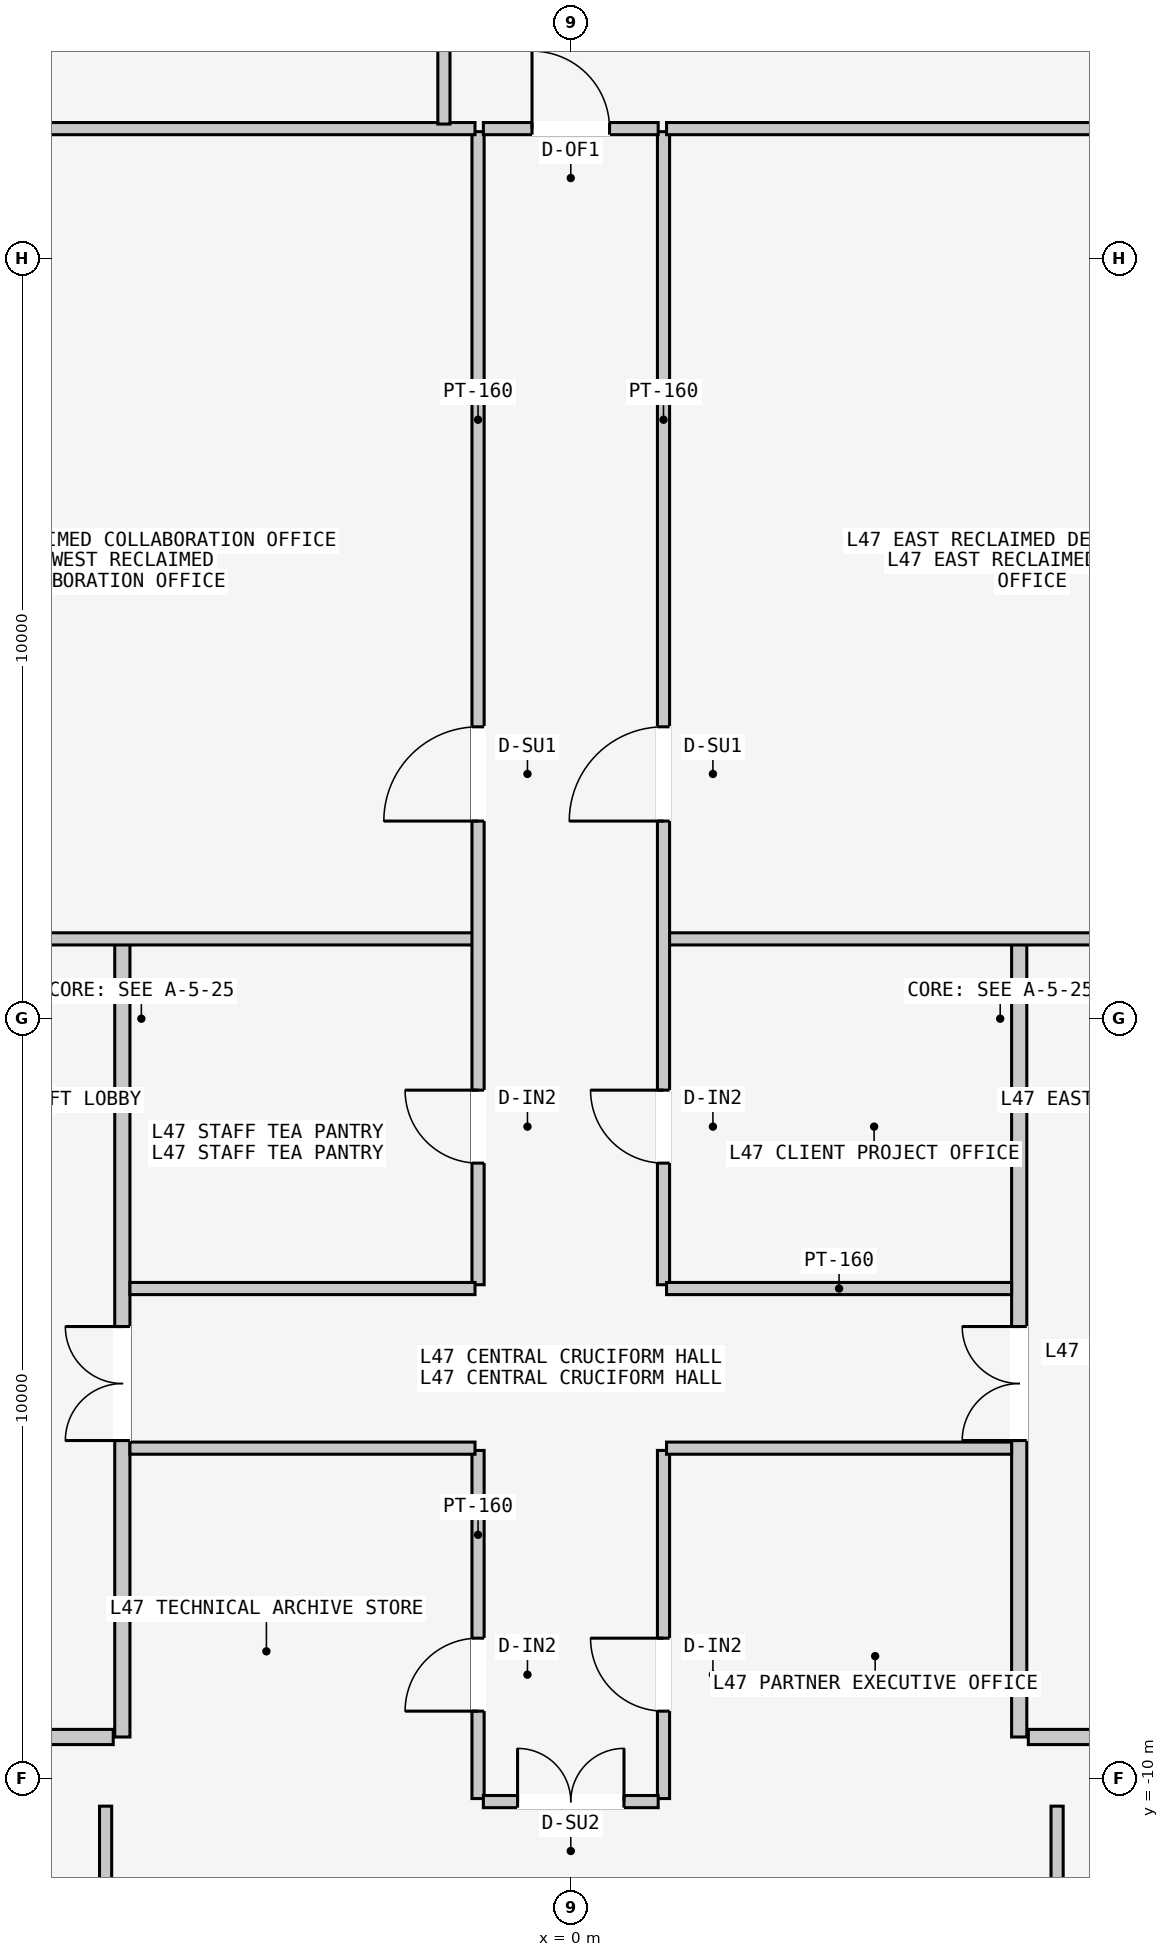
"""IFC4 building model, lengths in metres.
Left out: names, types, materials, properties, quantities, classifications, styles, units other than length and angle.
Written with IfcOpenShell. Run it as: python <this file> out.ifc"""

import sys

from ifc_helpers import new_model, si_unit, direction, frame, frame_2d, origin, place, context, subcontext, project, spatial, rectangle, extrude, element, fill, save


model = new_model("IFC4")
c1 = context("Model", 3, precision=1e-05, world=origin(), true_north=direction((0.0, 1.0)))
c2 = subcontext(c1, "Body", "Model", "MODEL_VIEW")
j1 = project(units=[si_unit("LENGTHUNIT", "METRE"), si_unit("PLANEANGLEUNIT", "RADIAN")], contexts=[c1])
p1 = place(None, origin())
s1 = spatial("IfcSite", under=j1, at=p1, CompositionType="ELEMENT")
p2 = place(p1, origin())
s2 = spatial("IfcBuilding", under=s1, at=p2, CompositionType="ELEMENT")
p3 = place(p2, frame((0.0, 0.0, 180.3)))
s3 = spatial("IfcBuildingStorey", under=s2, at=p3, CompositionType="ELEMENT", Elevation=180.3)
p4 = place(p3, frame((-5.9, -9.45, 0.0), z_axis=(0.0, 0.0, 1.0), x_axis=(0.0, 1.0, 0.0)))
e1 = element("IfcWall", 1, at=p4, inside=s3, PredefinedType="PARTITIONING", context=c2, shape_type="SweptSolid", body=[
    extrude(rectangle(XDim=10.5, YDim=0.2, at=frame_2d((5.25, 0.0))), origin(), (0.0, 0.0, 1.0), 3.4),
])
p5 = place(p4, frame((3.9, 0.0, 0.0)))
e2 = element("IfcOpeningElement", 2, at=p5, cuts=e1, PredefinedType="OPENING", context=c2, shape_type="SweptSolid", body=[
    extrude(rectangle(XDim=1.5, YDim=2.2, at=frame_2d((0.75, 1.1))), frame((0.0, 0.11, 0.0), z_axis=(0.0, -1.0, 0.0), x_axis=(1.0, 0.0, 0.0)), (0.0, 0.0, 1.0), 0.22),
])
p6 = place(p3, frame((-6.02, -9.45, 0.0), z_axis=(0.0, 0.0, 1.0), x_axis=(-1.0, 0.0, 0.0)))
e3 = element("IfcWall", 3, at=p6, inside=s3, PredefinedType="PARTITIONING", context=c2, shape_type="SweptSolid", body=[
    extrude(rectangle(XDim=1.8, YDim=0.2, at=frame_2d((0.9, 0.0))), origin(), (0.0, 0.0, 1.0), 3.4),
])
p7 = place(p3, frame((5.9, -9.45, 0.0), z_axis=(0.0, 0.0, 1.0), x_axis=(0.0, 1.0, 0.0)))
e4 = element("IfcWall", 4, at=p7, inside=s3, PredefinedType="PARTITIONING", context=c2, shape_type="SweptSolid", body=[
    extrude(rectangle(XDim=10.5, YDim=0.2, at=frame_2d((5.25, 0.0))), origin(), (0.0, 0.0, 1.0), 3.4),
])
p8 = place(p7, frame((3.9, 0.0, 0.0)))
e5 = element("IfcOpeningElement", 5, at=p8, cuts=e4, PredefinedType="OPENING", context=c2, shape_type="SweptSolid", body=[
    extrude(rectangle(XDim=1.5, YDim=2.2, at=frame_2d((0.75, 1.1))), frame((0.0, 0.11, 0.0), z_axis=(0.0, -1.0, 0.0), x_axis=(1.0, 0.0, 0.0)), (0.0, 0.0, 1.0), 0.22),
])
p9 = place(p3, frame((6.02, -9.45, 0.0), z_axis=(0.0, 0.0, 1.0), x_axis=(1.0, 0.0, 0.0)))
e6 = element("IfcWall", 6, at=p9, inside=s3, PredefinedType="PARTITIONING", context=c2, shape_type="SweptSolid", body=[
    extrude(rectangle(XDim=1.8, YDim=0.2, at=frame_2d((0.9, 0.0))), origin(), (0.0, 0.0, 1.0), 3.4),
])
p10 = place(p3, frame((-10.05, 1.05, 0.0), z_axis=(0.0, 0.0, 1.0), x_axis=(1.0, 0.0, 0.0)))
e7 = element("IfcWall", 7, at=p10, inside=s3, PredefinedType="PARTITIONING", context=c2, shape_type="SweptSolid", body=[
    extrude(rectangle(XDim=8.79, YDim=0.16, at=frame_2d((4.395, 0.0))), origin(), (0.0, 0.0, 1.0), 3.4),
])
p11 = place(p3, frame((-1.22, -3.5, 0.0), z_axis=(0.0, 0.0, 1.0), x_axis=(0.0, 1.0, 0.0)))
e8 = element("IfcWall", 8, at=p11, inside=s3, PredefinedType="PARTITIONING", context=c2, shape_type="SweptSolid", body=[
    extrude(rectangle(XDim=15.17, YDim=0.16, at=frame_2d((7.585, 0.0))), origin(), (0.0, 0.0, 1.0), 3.4),
])
p12 = place(p11, frame((6.1, 0.0, 0.0)))
e9 = element("IfcOpeningElement", 9, at=p12, cuts=e8, PredefinedType="OPENING", context=c2, shape_type="SweptSolid", body=[
    extrude(rectangle(XDim=1.24, YDim=2.24, at=frame_2d((0.62, 1.12))), frame((0.0, 0.09, 0.0), z_axis=(0.0, -1.0, 0.0), x_axis=(1.0, 0.0, 0.0)), (0.0, 0.0, 1.0), 0.18),
])
p13 = place(p11, frame((1.6, 0.0, 0.0)))
e10 = element("IfcOpeningElement", 10, at=p13, cuts=e8, PredefinedType="OPENING", context=c2, shape_type="SweptSolid", body=[
    extrude(rectangle(XDim=0.96, YDim=2.18, at=frame_2d((0.48, 1.09))), frame((0.0, 0.09, 0.0), z_axis=(0.0, -1.0, 0.0), x_axis=(1.0, 0.0, 0.0)), (0.0, 0.0, 1.0), 0.18),
])
p14 = place(p3, frame((-7.5, 11.71, 0.0), z_axis=(0.0, 0.0, 1.0), x_axis=(1.0, 0.0, 0.0)))
e11 = element("IfcWall", 11, at=p14, inside=s3, PredefinedType="PARTITIONING", context=c2, shape_type="SweptSolid", body=[
    extrude(rectangle(XDim=6.24, YDim=0.16, at=frame_2d((3.12, 0.0))), origin(), (0.0, 0.0, 1.0), 3.4),
])
p15 = place(p3, frame((-5.8, -3.55, 0.0), z_axis=(0.0, 0.0, 1.0), x_axis=(1.0, 0.0, 0.0)))
e12 = element("IfcWall", 12, at=p15, inside=s3, PredefinedType="PARTITIONING", context=c2, shape_type="SweptSolid", body=[
    extrude(rectangle(XDim=4.54, YDim=0.16, at=frame_2d((2.27, 0.0))), origin(), (0.0, 0.0, 1.0), 3.4),
])
p16 = place(p3, frame((1.26, 1.05, 0.0), z_axis=(0.0, 0.0, 1.0), x_axis=(1.0, 0.0, 0.0)))
e13 = element("IfcWall", 13, at=p16, inside=s3, PredefinedType="PARTITIONING", context=c2, shape_type="SweptSolid", body=[
    extrude(rectangle(XDim=8.8, YDim=0.16, at=frame_2d((4.4, 0.0))), origin(), (0.0, 0.0, 1.0), 3.4),
])
p17 = place(p3, frame((1.22, -3.5, 0.0), z_axis=(0.0, 0.0, 1.0), x_axis=(0.0, 1.0, 0.0)))
e14 = element("IfcWall", 14, at=p17, inside=s3, PredefinedType="PARTITIONING", context=c2, shape_type="SweptSolid", body=[
    extrude(rectangle(XDim=15.17, YDim=0.16, at=frame_2d((7.585, 0.0))), origin(), (0.0, 0.0, 1.0), 3.4),
])
p18 = place(p17, frame((6.1, 0.0, 0.0)))
e15 = element("IfcOpeningElement", 15, at=p18, cuts=e14, PredefinedType="OPENING", context=c2, shape_type="SweptSolid", body=[
    extrude(rectangle(XDim=1.24, YDim=2.24, at=frame_2d((0.62, 1.12))), frame((0.0, 0.09, 0.0), z_axis=(0.0, -1.0, 0.0), x_axis=(1.0, 0.0, 0.0)), (0.0, 0.0, 1.0), 0.18),
])
p19 = place(p17, frame((1.6, 0.0, 0.0)))
e16 = element("IfcOpeningElement", 16, at=p19, cuts=e14, PredefinedType="OPENING", context=c2, shape_type="SweptSolid", body=[
    extrude(rectangle(XDim=0.96, YDim=2.18, at=frame_2d((0.48, 1.09))), frame((0.0, 0.09, 0.0), z_axis=(0.0, -1.0, 0.0), x_axis=(1.0, 0.0, 0.0)), (0.0, 0.0, 1.0), 0.18),
])
p20 = place(p3, frame((1.26, 11.71, 0.0), z_axis=(0.0, 0.0, 1.0), x_axis=(1.0, 0.0, 0.0)))
e17 = element("IfcWall", 17, at=p20, inside=s3, PredefinedType="PARTITIONING", context=c2, shape_type="SweptSolid", body=[
    extrude(rectangle(XDim=6.24, YDim=0.16, at=frame_2d((3.12, 0.0))), origin(), (0.0, 0.0, 1.0), 3.4),
])
p21 = place(p3, frame((1.26, -3.55, 0.0), z_axis=(0.0, 0.0, 1.0), x_axis=(1.0, 0.0, 0.0)))
e18 = element("IfcWall", 18, at=p21, inside=s3, PredefinedType="PARTITIONING", context=c2, shape_type="SweptSolid", body=[
    extrude(rectangle(XDim=4.54, YDim=0.16, at=frame_2d((2.27, 0.0))), origin(), (0.0, 0.0, 1.0), 3.4),
])
p22 = place(p3, frame((-1.22, -10.26, 0.0), z_axis=(0.0, 0.0, 1.0), x_axis=(0.0, 1.0, 0.0)))
e19 = element("IfcWall", 19, at=p22, inside=s3, PredefinedType="PARTITIONING", context=c2, shape_type="SweptSolid", body=[
    extrude(rectangle(XDim=4.58, YDim=0.16, at=frame_2d((2.29, 0.0))), origin(), (0.0, 0.0, 1.0), 3.4),
])
p23 = place(p22, frame((1.15, 0.0, 0.0)))
e20 = element("IfcOpeningElement", 20, at=p23, cuts=e19, PredefinedType="OPENING", context=c2, shape_type="SweptSolid", body=[
    extrude(rectangle(XDim=0.96, YDim=2.18, at=frame_2d((0.48, 1.09))), frame((0.0, 0.09, 0.0), z_axis=(0.0, -1.0, 0.0), x_axis=(1.0, 0.0, 0.0)), (0.0, 0.0, 1.0), 0.18),
])
p24 = place(p3, frame((1.22, -10.26, 0.0), z_axis=(0.0, 0.0, 1.0), x_axis=(0.0, 1.0, 0.0)))
e21 = element("IfcWall", 21, at=p24, inside=s3, PredefinedType="PARTITIONING", context=c2, shape_type="SweptSolid", body=[
    extrude(rectangle(XDim=4.58, YDim=0.16, at=frame_2d((2.29, 0.0))), origin(), (0.0, 0.0, 1.0), 3.4),
])
p25 = place(p24, frame((1.15, 0.0, 0.0)))
e22 = element("IfcOpeningElement", 22, at=p25, cuts=e21, PredefinedType="OPENING", context=c2, shape_type="SweptSolid", body=[
    extrude(rectangle(XDim=0.96, YDim=2.18, at=frame_2d((0.48, 1.09))), frame((0.0, 0.09, 0.0), z_axis=(0.0, -1.0, 0.0), x_axis=(1.0, 0.0, 0.0)), (0.0, 0.0, 1.0), 0.18),
])
for number, where, z_axis, x_axis in (
    (23, (-5.8, -5.65, 0.0), (0.0, 0.0, 1.0), (1.0, 0.0, 0.0)),
    (24, (1.26, -5.65, 0.0), (0.0, 0.0, 1.0), (1.0, 0.0, 0.0)),
):
    element("IfcWall", number, at=place(p3, frame(where, z_axis=z_axis, x_axis=x_axis)), inside=s3, PredefinedType="PARTITIONING", context=c2, shape_type="SweptSolid", body=[
        extrude(rectangle(XDim=4.54, YDim=0.16, at=frame_2d((2.27, 0.0))), origin(), (0.0, 0.0, 1.0), 3.4),
    ])
p26 = place(p3, frame((-1.669, 11.77, 0.0), z_axis=(0.0, 0.0, 1.0), x_axis=(0.0, 1.0, 0.0)))
e25 = element("IfcWall", 25, at=p26, inside=s3, PredefinedType="PARTITIONING", context=c2, shape_type="SweptSolid", body=[
    extrude(rectangle(XDim=6.79, YDim=0.16, at=frame_2d((3.395, 0.0))), origin(), (0.0, 0.0, 1.0), 3.4),
])
p27 = place(p26, frame((1.15, 0.0, 0.0)))
e26 = element("IfcOpeningElement", 26, at=p27, cuts=e25, PredefinedType="OPENING", context=c2, shape_type="SweptSolid", body=[
    extrude(rectangle(XDim=0.96, YDim=2.18, at=frame_2d((0.48, 1.09))), frame((0.0, 0.09, 0.0), z_axis=(0.0, -1.0, 0.0), x_axis=(1.0, 0.0, 0.0)), (0.0, 0.0, 1.0), 0.18),
])
p28 = place(p3, frame((-1.15, 11.71, 0.0), z_axis=(0.0, 0.0, 1.0), x_axis=(1.0, 0.0, 0.0)))
e27 = element("IfcWall", 27, at=p28, inside=s3, PredefinedType="PARTITIONING", context=c2, shape_type="SweptSolid", body=[
    extrude(rectangle(XDim=2.3, YDim=0.16, at=frame_2d((1.15, 0.0))), origin(), (0.0, 0.0, 1.0), 3.4),
])
p29 = place(p28, frame((0.64, 0.0, 0.0)))
e28 = element("IfcOpeningElement", 28, at=p29, cuts=e27, PredefinedType="OPENING", context=c2, shape_type="SweptSolid", body=[
    extrude(rectangle(XDim=1.02, YDim=2.2, at=frame_2d((0.51, 1.1))), frame((0.0, 0.09, 0.0), z_axis=(0.0, -1.0, 0.0), x_axis=(1.0, 0.0, 0.0)), (0.0, 0.0, 1.0), 0.18),
])
p30 = place(p3, frame((-6.12, -18.56, 0.0), z_axis=(0.0, 0.0, 1.0), x_axis=(0.0, 1.0, 0.0)))
e29 = element("IfcWall", 29, at=p30, inside=s3, PredefinedType="PARTITIONING", context=c2, shape_type="SweptSolid", body=[
    extrude(rectangle(XDim=8.2, YDim=0.16, at=frame_2d((4.1, 0.0))), origin(), (0.0, 0.0, 1.0), 3.4),
])
p31 = place(p30, frame((1.05, 0.0, 0.0)))
e30 = element("IfcOpeningElement", 30, at=p31, cuts=e29, PredefinedType="OPENING", context=c2, shape_type="SweptSolid", body=[
    extrude(rectangle(XDim=0.96, YDim=2.18, at=frame_2d((0.48, 1.09))), frame((0.0, 0.09, 0.0), z_axis=(0.0, -1.0, 0.0), x_axis=(1.0, 0.0, 0.0)), (0.0, 0.0, 1.0), 0.18),
])
p32 = place(p3, frame((6.399, -18.56, 0.0), z_axis=(0.0, 0.0, 1.0), x_axis=(0.0, 1.0, 0.0)))
e31 = element("IfcWall", 31, at=p32, inside=s3, PredefinedType="PARTITIONING", context=c2, shape_type="SweptSolid", body=[
    extrude(rectangle(XDim=8.2, YDim=0.16, at=frame_2d((4.1, 0.0))), origin(), (0.0, 0.0, 1.0), 3.4),
])
p33 = place(p32, frame((1.34, 0.0, 0.0)))
e32 = element("IfcOpeningElement", 32, at=p33, cuts=e31, PredefinedType="OPENING", context=c2, shape_type="SweptSolid", body=[
    extrude(rectangle(XDim=0.96, YDim=2.18, at=frame_2d((0.48, 1.09))), frame((0.0, 0.09, 0.0), z_axis=(0.0, -1.0, 0.0), x_axis=(1.0, 0.0, 0.0)), (0.0, 0.0, 1.0), 0.18),
])
p34 = place(p3, frame((-1.15, -10.3, 0.0), z_axis=(0.0, 0.0, 1.0), x_axis=(1.0, 0.0, 0.0)))
e33 = element("IfcWall", 33, at=p34, inside=s3, PredefinedType="PARTITIONING", context=c2, shape_type="SweptSolid", body=[
    extrude(rectangle(XDim=2.3, YDim=0.16, at=frame_2d((1.15, 0.0))), origin(), (0.0, 0.0, 1.0), 3.4),
])
p35 = place(p34, frame((0.45, 0.0, 0.0)))
e34 = element("IfcOpeningElement", 34, at=p35, cuts=e33, PredefinedType="OPENING", context=c2, shape_type="SweptSolid", body=[
    extrude(rectangle(XDim=1.4, YDim=2.2, at=frame_2d((0.7, 1.1))), frame((0.0, 0.09, 0.0), z_axis=(0.0, -1.0, 0.0), x_axis=(1.0, 0.0, 0.0)), (0.0, 0.0, 1.0), 0.18),
])
p36 = place(p5, origin())
e35 = element("IfcDoor", 35, at=p36, inside=s3, OperationType="DOUBLE_DOOR_SINGLE_SWING", PredefinedType="DOOR", context=c2, shape_type="SweptSolid", body=[
    extrude(rectangle(XDim=1.5, YDim=2.2, at=frame_2d((0.75, 1.1))), frame((0.0, 0.025, 0.0), z_axis=(0.0, -1.0, 0.0), x_axis=(1.0, 0.0, 0.0)), (0.0, 0.0, 1.0), 0.05),
])
fill(e2, e35)
p37 = place(p8, origin())
e36 = element("IfcDoor", 36, at=p37, inside=s3, OperationType="DOUBLE_DOOR_SINGLE_SWING", PredefinedType="DOOR", context=c2, shape_type="SweptSolid", body=[
    extrude(rectangle(XDim=1.5, YDim=2.2, at=frame_2d((0.75, 1.1))), frame((0.0, 0.025, 0.0), z_axis=(0.0, -1.0, 0.0), x_axis=(1.0, 0.0, 0.0)), (0.0, 0.0, 1.0), 0.05),
])
fill(e5, e36)
p38 = place(p12, origin())
e37 = element("IfcDoor", 37, at=p38, inside=s3, OperationType="SINGLE_SWING_LEFT", PredefinedType="DOOR", context=c2, shape_type="SweptSolid", body=[
    extrude(rectangle(XDim=1.24, YDim=2.24, at=frame_2d((0.62, 1.12))), frame((0.0, 0.025, 0.0), z_axis=(0.0, -1.0, 0.0), x_axis=(1.0, 0.0, 0.0)), (0.0, 0.0, 1.0), 0.05),
])
fill(e9, e37)
p39 = place(p13, origin())
e38 = element("IfcDoor", 38, at=p39, inside=s3, OperationType="SINGLE_SWING_RIGHT", PredefinedType="DOOR", context=c2, shape_type="SweptSolid", body=[
    extrude(rectangle(XDim=0.96, YDim=2.18, at=frame_2d((0.48, 1.09))), frame((0.0, 0.025, 0.0), z_axis=(0.0, -1.0, 0.0), x_axis=(1.0, 0.0, 0.0)), (0.0, 0.0, 1.0), 0.05),
])
fill(e10, e38)
p40 = place(p18, origin())
e39 = element("IfcDoor", 39, at=p40, inside=s3, OperationType="SINGLE_SWING_LEFT", PredefinedType="DOOR", context=c2, shape_type="SweptSolid", body=[
    extrude(rectangle(XDim=1.24, YDim=2.24, at=frame_2d((0.62, 1.12))), frame((0.0, 0.025, 0.0), z_axis=(0.0, -1.0, 0.0), x_axis=(1.0, 0.0, 0.0)), (0.0, 0.0, 1.0), 0.05),
])
fill(e15, e39)
p41 = place(p19, origin())
e40 = element("IfcDoor", 40, at=p41, inside=s3, OperationType="SINGLE_SWING_RIGHT", PredefinedType="DOOR", context=c2, shape_type="SweptSolid", body=[
    extrude(rectangle(XDim=0.96, YDim=2.18, at=frame_2d((0.48, 1.09))), frame((0.0, 0.025, 0.0), z_axis=(0.0, -1.0, 0.0), x_axis=(1.0, 0.0, 0.0)), (0.0, 0.0, 1.0), 0.05),
])
fill(e16, e40)
p42 = place(p23, origin())
e41 = element("IfcDoor", 41, at=p42, inside=s3, OperationType="SINGLE_SWING_LEFT", PredefinedType="DOOR", context=c2, shape_type="SweptSolid", body=[
    extrude(rectangle(XDim=0.96, YDim=2.18, at=frame_2d((0.48, 1.09))), frame((0.0, 0.025, 0.0), z_axis=(0.0, -1.0, 0.0), x_axis=(1.0, 0.0, 0.0)), (0.0, 0.0, 1.0), 0.05),
])
fill(e20, e41)
p43 = place(p25, origin())
e42 = element("IfcDoor", 42, at=p43, inside=s3, OperationType="SINGLE_SWING_RIGHT", PredefinedType="DOOR", context=c2, shape_type="SweptSolid", body=[
    extrude(rectangle(XDim=0.96, YDim=2.18, at=frame_2d((0.48, 1.09))), frame((0.0, 0.025, 0.0), z_axis=(0.0, -1.0, 0.0), x_axis=(1.0, 0.0, 0.0)), (0.0, 0.0, 1.0), 0.05),
])
fill(e22, e42)
p44 = place(p29, origin())
e43 = element("IfcDoor", 43, at=p44, inside=s3, OperationType="SINGLE_SWING_LEFT", PredefinedType="DOOR", context=c2, shape_type="SweptSolid", body=[
    extrude(rectangle(XDim=1.02, YDim=2.2, at=frame_2d((0.51, 1.1))), frame((0.0, 0.025, 0.0), z_axis=(0.0, -1.0, 0.0), x_axis=(1.0, 0.0, 0.0)), (0.0, 0.0, 1.0), 0.05),
])
fill(e28, e43)
p45 = place(p35, origin())
e44 = element("IfcDoor", 44, at=p45, inside=s3, OperationType="DOUBLE_DOOR_SINGLE_SWING", PredefinedType="DOOR", context=c2, shape_type="SweptSolid", body=[
    extrude(rectangle(XDim=1.4, YDim=2.2, at=frame_2d((0.7, 1.1))), frame((0.0, 0.025, 0.0), z_axis=(0.0, -1.0, 0.0), x_axis=(1.0, 0.0, 0.0)), (0.0, 0.0, 1.0), 0.05),
])
fill(e34, e44)
save(model, sys.argv[1])
